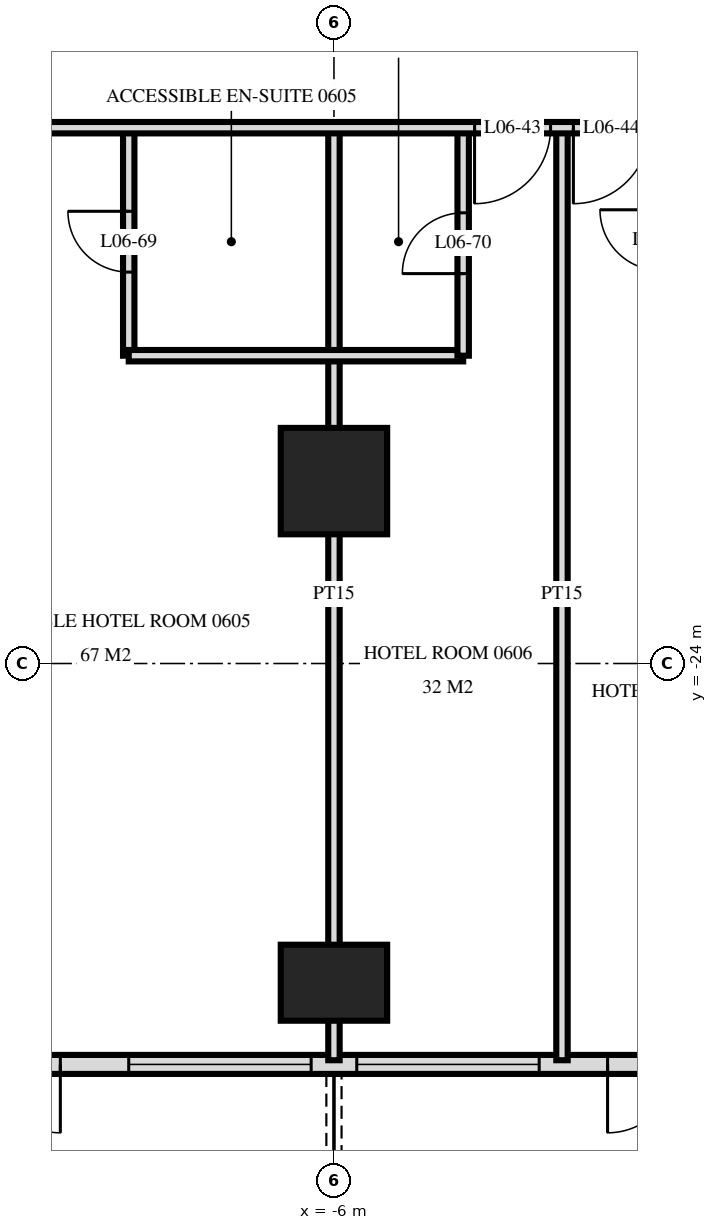
"""IFC4 building model, lengths in metres.
Left out: names, types, materials, properties, quantities, classifications, styles, units other than length and angle.
Written with IfcOpenShell. Run it as: python <this file> out.ifc"""

import sys

from ifc_helpers import new_model, si_unit, direction, frame, frame_2d, origin, origin_2d, place, context, subcontext, project, spatial, rectangle, extrude, element, fill, save


model = new_model("IFC4")
c1 = context("Model", 3, precision=1e-05, world=origin(), true_north=direction((0.0, 1.0)))
c2 = subcontext(c1, "Body", "Model", "MODEL_VIEW")
j1 = project(units=[si_unit("LENGTHUNIT", "METRE"), si_unit("PLANEANGLEUNIT", "RADIAN")], contexts=[c1])
p1 = place(None, origin())
s1 = spatial("IfcSite", under=j1, at=p1, CompositionType="ELEMENT")
p2 = place(p1, origin())
s2 = spatial("IfcBuilding", under=s1, at=p2, CompositionType="ELEMENT")
p3 = place(p2, frame((0.0, 0.0, 31.2)))
s3 = spatial("IfcBuildingStorey", under=s2, at=p3, CompositionType="ELEMENT", Elevation=31.2)
p4 = place(p3, frame((-6.0, -28.2, 0.0), z_axis=(0.0, 0.0, 1.0), x_axis=(1.0, 0.0, 0.0)))
e1 = element("IfcColumn", 1, at=p4, inside=s3, PredefinedType="COLUMN", context=c2, shape_type="SweptSolid", body=[
    extrude(rectangle(XDim=1.4, YDim=1.0, at=origin_2d()), origin(), (0.0, 0.0, 1.0), 3.6),
])
p5 = place(p3, frame((-6.0, -21.6, 0.0), z_axis=(0.0, 0.0, 1.0), x_axis=(1.0, 0.0, 0.0)))
e2 = element("IfcColumn", 2, at=p5, inside=s3, PredefinedType="COLUMN", context=c2, shape_type="SweptSolid", body=[
    extrude(rectangle(XDim=1.4, YDim=1.4, at=origin_2d()), origin(), (0.0, 0.0, 1.0), 3.6),
])
p6 = place(p3, frame((-28.775, -29.275, 0.0), z_axis=(0.0, 0.0, 1.0), x_axis=(1.0, 0.0, 0.0)))
e3 = element("IfcWall", 3, at=p6, inside=s3, PredefinedType="SOLIDWALL", context=c2, shape_type="SweptSolid", body=[
    extrude(rectangle(XDim=57.551, YDim=0.25, at=frame_2d((28.775, 0.0))), origin(), (0.0, 0.0, 1.0), 3.32),
])
p7 = place(p6, frame((0.575, 0.0, 0.0)))
e4 = element("IfcOpeningElement", 4, at=p7, cuts=e3, PredefinedType="OPENING", context=c2, shape_type="SweptSolid", body=[
    extrude(rectangle(XDim=1.8, YDim=2.4, at=frame_2d((0.9, 1.2))), frame((0.0, 0.135, 0.0), z_axis=(0.0, -1.0, 0.0), x_axis=(1.0, 0.0, 0.0)), (0.0, 0.0, 1.0), 0.27),
])
p8 = place(p6, frame((5.375, 0.0, 0.0)))
e5 = element("IfcOpeningElement", 5, at=p8, cuts=e3, PredefinedType="OPENING", context=c2, shape_type="SweptSolid", body=[
    extrude(rectangle(XDim=1.8, YDim=2.4, at=frame_2d((0.9, 1.2))), frame((0.0, 0.135, 0.0), z_axis=(0.0, -1.0, 0.0), x_axis=(1.0, 0.0, 0.0)), (0.0, 0.0, 1.0), 0.27),
])
p9 = place(p6, frame((8.075, 0.0, 0.3)))
e6 = element("IfcOpeningElement", 6, at=p9, cuts=e3, PredefinedType="OPENING", context=c2, shape_type="SweptSolid", body=[
    extrude(rectangle(XDim=2.4, YDim=2.1, at=frame_2d((1.2, 1.05))), frame((0.0, 0.135, 0.0), z_axis=(0.0, -1.0, 0.0), x_axis=(1.0, 0.0, 0.0)), (0.0, 0.0, 1.0), 0.27),
])
p10 = place(p6, frame((11.375, 0.0, 0.0)))
e7 = element("IfcOpeningElement", 7, at=p10, cuts=e3, PredefinedType="OPENING", context=c2, shape_type="SweptSolid", body=[
    extrude(rectangle(XDim=1.8, YDim=2.4, at=frame_2d((0.9, 1.2))), frame((0.0, 0.135, 0.0), z_axis=(0.0, -1.0, 0.0), x_axis=(1.0, 0.0, 0.0)), (0.0, 0.0, 1.0), 0.27),
])
p11 = place(p6, frame((14.075, 0.0, 0.3)))
e8 = element("IfcOpeningElement", 8, at=p11, cuts=e3, PredefinedType="OPENING", context=c2, shape_type="SweptSolid", body=[
    extrude(rectangle(XDim=2.4, YDim=2.1, at=frame_2d((1.2, 1.05))), frame((0.0, 0.135, 0.0), z_axis=(0.0, -1.0, 0.0), x_axis=(1.0, 0.0, 0.0)), (0.0, 0.0, 1.0), 0.27),
])
p12 = place(p6, frame((17.375, 0.0, 0.0)))
e9 = element("IfcOpeningElement", 9, at=p12, cuts=e3, PredefinedType="OPENING", context=c2, shape_type="SweptSolid", body=[
    extrude(rectangle(XDim=1.8, YDim=2.4, at=frame_2d((0.9, 1.2))), frame((0.0, 0.135, 0.0), z_axis=(0.0, -1.0, 0.0), x_axis=(1.0, 0.0, 0.0)), (0.0, 0.0, 1.0), 0.27),
])
p13 = place(p6, frame((20.075, 0.0, 0.3)))
e10 = element("IfcOpeningElement", 10, at=p13, cuts=e3, PredefinedType="OPENING", context=c2, shape_type="SweptSolid", body=[
    extrude(rectangle(XDim=2.4, YDim=2.1, at=frame_2d((1.2, 1.05))), frame((0.0, 0.135, 0.0), z_axis=(0.0, -1.0, 0.0), x_axis=(1.0, 0.0, 0.0)), (0.0, 0.0, 1.0), 0.27),
])
p14 = place(p6, frame((23.075, 0.0, 0.3)))
e11 = element("IfcOpeningElement", 11, at=p14, cuts=e3, PredefinedType="OPENING", context=c2, shape_type="SweptSolid", body=[
    extrude(rectangle(XDim=2.4, YDim=2.1, at=frame_2d((1.2, 1.05))), frame((0.0, 0.135, 0.0), z_axis=(0.0, -1.0, 0.0), x_axis=(1.0, 0.0, 0.0)), (0.0, 0.0, 1.0), 0.27),
])
p15 = place(p6, frame((26.375, 0.0, 0.0)))
e12 = element("IfcOpeningElement", 12, at=p15, cuts=e3, PredefinedType="OPENING", context=c2, shape_type="SweptSolid", body=[
    extrude(rectangle(XDim=1.8, YDim=2.4, at=frame_2d((0.9, 1.2))), frame((0.0, 0.135, 0.0), z_axis=(0.0, -1.0, 0.0), x_axis=(1.0, 0.0, 0.0)), (0.0, 0.0, 1.0), 0.27),
])
p16 = place(p6, frame((29.375, 0.0, 0.0)))
e13 = element("IfcOpeningElement", 13, at=p16, cuts=e3, PredefinedType="OPENING", context=c2, shape_type="SweptSolid", body=[
    extrude(rectangle(XDim=1.8, YDim=2.4, at=frame_2d((0.9, 1.2))), frame((0.0, 0.135, 0.0), z_axis=(0.0, -1.0, 0.0), x_axis=(1.0, 0.0, 0.0)), (0.0, 0.0, 1.0), 0.27),
])
p17 = place(p6, frame((32.075, 0.0, 0.3)))
e14 = element("IfcOpeningElement", 14, at=p17, cuts=e3, PredefinedType="OPENING", context=c2, shape_type="SweptSolid", body=[
    extrude(rectangle(XDim=2.4, YDim=2.1, at=frame_2d((1.2, 1.05))), frame((0.0, 0.135, 0.0), z_axis=(0.0, -1.0, 0.0), x_axis=(1.0, 0.0, 0.0)), (0.0, 0.0, 1.0), 0.27),
])
p18 = place(p6, frame((35.375, 0.0, 0.0)))
e15 = element("IfcOpeningElement", 15, at=p18, cuts=e3, PredefinedType="OPENING", context=c2, shape_type="SweptSolid", body=[
    extrude(rectangle(XDim=1.8, YDim=2.4, at=frame_2d((0.9, 1.2))), frame((0.0, 0.135, 0.0), z_axis=(0.0, -1.0, 0.0), x_axis=(1.0, 0.0, 0.0)), (0.0, 0.0, 1.0), 0.27),
])
p19 = place(p6, frame((38.075, 0.0, 0.3)))
e16 = element("IfcOpeningElement", 16, at=p19, cuts=e3, PredefinedType="OPENING", context=c2, shape_type="SweptSolid", body=[
    extrude(rectangle(XDim=2.4, YDim=2.1, at=frame_2d((1.2, 1.05))), frame((0.0, 0.135, 0.0), z_axis=(0.0, -1.0, 0.0), x_axis=(1.0, 0.0, 0.0)), (0.0, 0.0, 1.0), 0.27),
])
p20 = place(p6, frame((41.375, 0.0, 0.0)))
e17 = element("IfcOpeningElement", 17, at=p20, cuts=e3, PredefinedType="OPENING", context=c2, shape_type="SweptSolid", body=[
    extrude(rectangle(XDim=1.8, YDim=2.4, at=frame_2d((0.9, 1.2))), frame((0.0, 0.135, 0.0), z_axis=(0.0, -1.0, 0.0), x_axis=(1.0, 0.0, 0.0)), (0.0, 0.0, 1.0), 0.27),
])
p21 = place(p6, frame((44.075, 0.0, 0.3)))
e18 = element("IfcOpeningElement", 18, at=p21, cuts=e3, PredefinedType="OPENING", context=c2, shape_type="SweptSolid", body=[
    extrude(rectangle(XDim=2.4, YDim=2.1, at=frame_2d((1.2, 1.05))), frame((0.0, 0.135, 0.0), z_axis=(0.0, -1.0, 0.0), x_axis=(1.0, 0.0, 0.0)), (0.0, 0.0, 1.0), 0.27),
])
p22 = place(p6, frame((47.075, 0.0, 0.3)))
e19 = element("IfcOpeningElement", 19, at=p22, cuts=e3, PredefinedType="OPENING", context=c2, shape_type="SweptSolid", body=[
    extrude(rectangle(XDim=2.4, YDim=2.1, at=frame_2d((1.2, 1.05))), frame((0.0, 0.135, 0.0), z_axis=(0.0, -1.0, 0.0), x_axis=(1.0, 0.0, 0.0)), (0.0, 0.0, 1.0), 0.27),
])
p23 = place(p6, frame((50.375, 0.0, 0.0)))
e20 = element("IfcOpeningElement", 20, at=p23, cuts=e3, PredefinedType="OPENING", context=c2, shape_type="SweptSolid", body=[
    extrude(rectangle(XDim=1.8, YDim=2.4, at=frame_2d((0.9, 1.2))), frame((0.0, 0.135, 0.0), z_axis=(0.0, -1.0, 0.0), x_axis=(1.0, 0.0, 0.0)), (0.0, 0.0, 1.0), 0.27),
])
p24 = place(p6, frame((53.375, 0.0, 0.0)))
e21 = element("IfcOpeningElement", 21, at=p24, cuts=e3, PredefinedType="OPENING", context=c2, shape_type="SweptSolid", body=[
    extrude(rectangle(XDim=1.8, YDim=2.4, at=frame_2d((0.9, 1.2))), frame((0.0, 0.135, 0.0), z_axis=(0.0, -1.0, 0.0), x_axis=(1.0, 0.0, 0.0)), (0.0, 0.0, 1.0), 0.27),
])
p25 = place(p3, frame((-3.0, -29.22, 0.0), z_axis=(0.0, 0.0, 1.0), x_axis=(0.0, 1.0, 0.0)))
e22 = element("IfcWall", 22, at=p25, inside=s3, PredefinedType="PARTITIONING", context=c2, shape_type="SweptSolid", body=[
    extrude(rectangle(XDim=12.27, YDim=0.15, at=frame_2d((6.135, 0.0))), origin(), (0.0, 0.0, 1.0), 3.32),
])
p26 = place(p3, frame((-4.3, -19.95, 0.0), z_axis=(0.0, 0.0, 1.0), x_axis=(0.0, 1.0, 0.0)))
e23 = element("IfcWall", 23, at=p26, inside=s3, PredefinedType="PARTITIONING", context=c2, shape_type="SweptSolid", body=[
    extrude(rectangle(XDim=3.0, YDim=0.15, at=frame_2d((1.5, 0.0))), origin(), (0.0, 0.0, 1.0), 3.32),
])
p27 = place(p26, frame((1.08, 0.0, 0.0)))
e24 = element("IfcOpeningElement", 24, at=p27, cuts=e23, PredefinedType="OPENING", context=c2, shape_type="SweptSolid", body=[
    extrude(rectangle(XDim=0.8, YDim=2.1, at=frame_2d((0.4, 1.05))), frame((0.0, 0.085, 0.0), z_axis=(0.0, -1.0, 0.0), x_axis=(1.0, 0.0, 0.0)), (0.0, 0.0, 1.0), 0.17),
])
p28 = place(p3, frame((-6.0, -29.22, 0.0), z_axis=(0.0, 0.0, 1.0), x_axis=(0.0, 1.0, 0.0)))
e25 = element("IfcWall", 25, at=p28, inside=s3, PredefinedType="PARTITIONING", context=c2, shape_type="SweptSolid", body=[
    extrude(rectangle(XDim=12.27, YDim=0.15, at=frame_2d((6.135, 0.0))), origin(), (0.0, 0.0, 1.0), 3.32),
])
p29 = place(p3, frame((-8.7, -19.95, 0.0), z_axis=(0.0, 0.0, 1.0), x_axis=(0.0, 1.0, 0.0)))
e26 = element("IfcWall", 26, at=p29, inside=s3, PredefinedType="PARTITIONING", context=c2, shape_type="SweptSolid", body=[
    extrude(rectangle(XDim=3.0, YDim=0.15, at=frame_2d((1.5, 0.0))), origin(), (0.0, 0.0, 1.0), 3.32),
])
p30 = place(p29, frame((1.1, 0.0, 0.0)))
e27 = element("IfcOpeningElement", 27, at=p30, cuts=e26, PredefinedType="OPENING", context=c2, shape_type="SweptSolid", body=[
    extrude(rectangle(XDim=0.8, YDim=2.1, at=frame_2d((0.4, 1.05))), frame((0.0, 0.085, 0.0), z_axis=(0.0, -1.0, 0.0), x_axis=(1.0, 0.0, 0.0)), (0.0, 0.0, 1.0), 0.17),
])
p31 = place(p3, frame((-8.7, -19.95, 0.0), z_axis=(0.0, 0.0, 1.0), x_axis=(1.0, 0.0, 0.0)))
e28 = element("IfcWall", 28, at=p31, inside=s3, PredefinedType="PARTITIONING", context=c2, shape_type="SweptSolid", body=[
    extrude(rectangle(XDim=4.4, YDim=0.15, at=frame_2d((2.2, 0.0))), origin(), (0.0, 0.0, 1.0), 3.32),
])
p32 = place(p3, frame((-33.12, -16.95, 0.0), z_axis=(0.0, 0.0, 1.0), x_axis=(1.0, 0.0, 0.0)))
e29 = element("IfcWall", 29, at=p32, inside=s3, PredefinedType="PARTITIONING", context=c2, shape_type="SweptSolid", body=[
    extrude(rectangle(XDim=66.24, YDim=0.15, at=frame_2d((33.12, 0.0))), origin(), (0.0, 0.0, 1.0), 3.32),
])
p33 = place(p32, frame((9.27, 0.0, 0.0)))
e30 = element("IfcOpeningElement", 30, at=p33, cuts=e29, PredefinedType="OPENING", context=c2, shape_type="SweptSolid", body=[
    extrude(rectangle(XDim=1.0, YDim=2.1, at=frame_2d((0.5, 1.05))), frame((0.0, 0.085, 0.0), z_axis=(0.0, -1.0, 0.0), x_axis=(1.0, 0.0, 0.0)), (0.0, 0.0, 1.0), 0.17),
])
p34 = place(p32, frame((13.97, 0.0, 0.0)))
e31 = element("IfcOpeningElement", 31, at=p34, cuts=e29, PredefinedType="OPENING", context=c2, shape_type="SweptSolid", body=[
    extrude(rectangle(XDim=1.0, YDim=2.1, at=frame_2d((0.5, 1.05))), frame((0.0, 0.085, 0.0), z_axis=(0.0, -1.0, 0.0), x_axis=(1.0, 0.0, 0.0)), (0.0, 0.0, 1.0), 0.17),
])
p35 = place(p32, frame((15.27, 0.0, 0.0)))
e32 = element("IfcOpeningElement", 32, at=p35, cuts=e29, PredefinedType="OPENING", context=c2, shape_type="SweptSolid", body=[
    extrude(rectangle(XDim=1.0, YDim=2.1, at=frame_2d((0.5, 1.05))), frame((0.0, 0.085, 0.0), z_axis=(0.0, -1.0, 0.0), x_axis=(1.0, 0.0, 0.0)), (0.0, 0.0, 1.0), 0.17),
])
p36 = place(p32, frame((19.97, 0.0, 0.0)))
e33 = element("IfcOpeningElement", 33, at=p36, cuts=e29, PredefinedType="OPENING", context=c2, shape_type="SweptSolid", body=[
    extrude(rectangle(XDim=1.0, YDim=2.1, at=frame_2d((0.5, 1.05))), frame((0.0, 0.085, 0.0), z_axis=(0.0, -1.0, 0.0), x_axis=(1.0, 0.0, 0.0)), (0.0, 0.0, 1.0), 0.17),
])
p37 = place(p32, frame((22.27, 0.0, 0.0)))
e34 = element("IfcOpeningElement", 34, at=p37, cuts=e29, PredefinedType="OPENING", context=c2, shape_type="SweptSolid", body=[
    extrude(rectangle(XDim=1.0, YDim=2.1, at=frame_2d((0.5, 1.05))), frame((0.0, 0.085, 0.0), z_axis=(0.0, -1.0, 0.0), x_axis=(1.0, 0.0, 0.0)), (0.0, 0.0, 1.0), 0.17),
])
p38 = place(p32, frame((28.97, 0.0, 0.0)))
e35 = element("IfcOpeningElement", 35, at=p38, cuts=e29, PredefinedType="OPENING", context=c2, shape_type="SweptSolid", body=[
    extrude(rectangle(XDim=1.0, YDim=2.1, at=frame_2d((0.5, 1.05))), frame((0.0, 0.085, 0.0), z_axis=(0.0, -1.0, 0.0), x_axis=(1.0, 0.0, 0.0)), (0.0, 0.0, 1.0), 0.17),
])
p39 = place(p32, frame((30.27, 0.0, 0.0)))
e36 = element("IfcOpeningElement", 36, at=p39, cuts=e29, PredefinedType="OPENING", context=c2, shape_type="SweptSolid", body=[
    extrude(rectangle(XDim=1.0, YDim=2.1, at=frame_2d((0.5, 1.05))), frame((0.0, 0.085, 0.0), z_axis=(0.0, -1.0, 0.0), x_axis=(1.0, 0.0, 0.0)), (0.0, 0.0, 1.0), 0.17),
])
p40 = place(p32, frame((34.97, 0.0, 0.0)))
e37 = element("IfcOpeningElement", 37, at=p40, cuts=e29, PredefinedType="OPENING", context=c2, shape_type="SweptSolid", body=[
    extrude(rectangle(XDim=1.0, YDim=2.1, at=frame_2d((0.5, 1.05))), frame((0.0, 0.085, 0.0), z_axis=(0.0, -1.0, 0.0), x_axis=(1.0, 0.0, 0.0)), (0.0, 0.0, 1.0), 0.17),
])
p41 = place(p32, frame((36.27, 0.0, 0.0)))
e38 = element("IfcOpeningElement", 38, at=p41, cuts=e29, PredefinedType="OPENING", context=c2, shape_type="SweptSolid", body=[
    extrude(rectangle(XDim=1.0, YDim=2.1, at=frame_2d((0.5, 1.05))), frame((0.0, 0.085, 0.0), z_axis=(0.0, -1.0, 0.0), x_axis=(1.0, 0.0, 0.0)), (0.0, 0.0, 1.0), 0.17),
])
p42 = place(p32, frame((40.97, 0.0, 0.0)))
e39 = element("IfcOpeningElement", 39, at=p42, cuts=e29, PredefinedType="OPENING", context=c2, shape_type="SweptSolid", body=[
    extrude(rectangle(XDim=1.0, YDim=2.1, at=frame_2d((0.5, 1.05))), frame((0.0, 0.085, 0.0), z_axis=(0.0, -1.0, 0.0), x_axis=(1.0, 0.0, 0.0)), (0.0, 0.0, 1.0), 0.17),
])
p43 = place(p32, frame((42.27, 0.0, 0.0)))
e40 = element("IfcOpeningElement", 40, at=p43, cuts=e29, PredefinedType="OPENING", context=c2, shape_type="SweptSolid", body=[
    extrude(rectangle(XDim=1.0, YDim=2.1, at=frame_2d((0.5, 1.05))), frame((0.0, 0.085, 0.0), z_axis=(0.0, -1.0, 0.0), x_axis=(1.0, 0.0, 0.0)), (0.0, 0.0, 1.0), 0.17),
])
p44 = place(p32, frame((46.97, 0.0, 0.0)))
e41 = element("IfcOpeningElement", 41, at=p44, cuts=e29, PredefinedType="OPENING", context=c2, shape_type="SweptSolid", body=[
    extrude(rectangle(XDim=1.0, YDim=2.1, at=frame_2d((0.5, 1.05))), frame((0.0, 0.085, 0.0), z_axis=(0.0, -1.0, 0.0), x_axis=(1.0, 0.0, 0.0)), (0.0, 0.0, 1.0), 0.17),
])
p45 = place(p32, frame((48.27, 0.0, 0.0)))
e42 = element("IfcOpeningElement", 42, at=p45, cuts=e29, PredefinedType="OPENING", context=c2, shape_type="SweptSolid", body=[
    extrude(rectangle(XDim=1.0, YDim=2.1, at=frame_2d((0.5, 1.05))), frame((0.0, 0.085, 0.0), z_axis=(0.0, -1.0, 0.0), x_axis=(1.0, 0.0, 0.0)), (0.0, 0.0, 1.0), 0.17),
])
p46 = place(p32, frame((52.97, 0.0, 0.0)))
e43 = element("IfcOpeningElement", 43, at=p46, cuts=e29, PredefinedType="OPENING", context=c2, shape_type="SweptSolid", body=[
    extrude(rectangle(XDim=1.0, YDim=2.1, at=frame_2d((0.5, 1.05))), frame((0.0, 0.085, 0.0), z_axis=(0.0, -1.0, 0.0), x_axis=(1.0, 0.0, 0.0)), (0.0, 0.0, 1.0), 0.17),
])
p47 = place(p32, frame((54.27, 0.0, 0.0)))
e44 = element("IfcOpeningElement", 44, at=p47, cuts=e29, PredefinedType="OPENING", context=c2, shape_type="SweptSolid", body=[
    extrude(rectangle(XDim=1.0, YDim=2.1, at=frame_2d((0.5, 1.05))), frame((0.0, 0.085, 0.0), z_axis=(0.0, -1.0, 0.0), x_axis=(1.0, 0.0, 0.0)), (0.0, 0.0, 1.0), 0.17),
])
p48 = place(p32, frame((4.4, 0.0, 0.0)))
e45 = element("IfcOpeningElement", 45, at=p48, cuts=e29, PredefinedType="OPENING", context=c2, shape_type="SweptSolid", body=[
    extrude(rectangle(XDim=1.0, YDim=2.1, at=frame_2d((0.5, 1.05))), frame((0.0, 0.085, 0.0), z_axis=(0.0, -1.0, 0.0), x_axis=(1.0, 0.0, 0.0)), (0.0, 0.0, 1.0), 0.17),
])
p49 = place(p32, frame((60.8, 0.0, 0.0)))
e46 = element("IfcOpeningElement", 46, at=p49, cuts=e29, PredefinedType="OPENING", context=c2, shape_type="SweptSolid", body=[
    extrude(rectangle(XDim=1.0, YDim=2.1, at=frame_2d((0.5, 1.05))), frame((0.0, 0.085, 0.0), z_axis=(0.0, -1.0, 0.0), x_axis=(1.0, 0.0, 0.0)), (0.0, 0.0, 1.0), 0.17),
])
p50 = place(p12, frame((0.9, 0.0, 0.0), z_axis=(0.0, 0.0, 1.0), x_axis=(-1.0, 0.0, 0.0)))
e47 = element("IfcDoor", 47, at=p50, inside=s3, OperationType="DOUBLE_DOOR_SINGLE_SWING", PredefinedType="DOOR", context=c2, shape_type="SweptSolid", body=[
    extrude(rectangle(XDim=1.8, YDim=2.4, at=frame_2d((0.0, 1.2))), frame((0.0, -0.025, 0.0), z_axis=(0.0, 1.0, 0.0), x_axis=(-1.0, 0.0, 0.0)), (0.0, 0.0, 1.0), 0.05),
])
fill(e9, e47)
p51 = place(p13, origin())
e48 = element("IfcWindow", 48, at=p51, inside=s3, PartitioningType="SINGLE_PANEL", PredefinedType="WINDOW", context=c2, shape_type="SweptSolid", body=[
    extrude(rectangle(XDim=2.4, YDim=2.1, at=frame_2d((1.2, 1.05))), frame((0.0, 0.03, 0.0), z_axis=(0.0, -1.0, 0.0), x_axis=(1.0, 0.0, 0.0)), (0.0, 0.0, 1.0), 0.06),
])
fill(e10, e48)
p52 = place(p14, origin())
e49 = element("IfcWindow", 49, at=p52, inside=s3, PartitioningType="SINGLE_PANEL", PredefinedType="WINDOW", context=c2, shape_type="SweptSolid", body=[
    extrude(rectangle(XDim=2.4, YDim=2.1, at=frame_2d((1.2, 1.05))), frame((0.0, 0.03, 0.0), z_axis=(0.0, -1.0, 0.0), x_axis=(1.0, 0.0, 0.0)), (0.0, 0.0, 1.0), 0.06),
])
fill(e11, e49)
p53 = place(p15, frame((0.9, 0.0, 0.0), z_axis=(0.0, 0.0, 1.0), x_axis=(-1.0, 0.0, 0.0)))
e50 = element("IfcDoor", 50, at=p53, inside=s3, OperationType="DOUBLE_DOOR_SINGLE_SWING", PredefinedType="DOOR", context=c2, shape_type="SweptSolid", body=[
    extrude(rectangle(XDim=1.8, YDim=2.4, at=frame_2d((0.0, 1.2))), frame((0.0, -0.025, 0.0), z_axis=(0.0, 1.0, 0.0), x_axis=(-1.0, 0.0, 0.0)), (0.0, 0.0, 1.0), 0.05),
])
fill(e12, e50)
p54 = place(p38, frame((0.5, 0.0, 0.0), z_axis=(0.0, 0.0, 1.0), x_axis=(-1.0, 0.0, 0.0)))
e51 = element("IfcDoor", 51, at=p54, inside=s3, OperationType="SINGLE_SWING_LEFT", PredefinedType="DOOR", context=c2, shape_type="SweptSolid", body=[
    extrude(rectangle(XDim=1.0, YDim=2.1, at=frame_2d((0.0, 1.05))), frame((0.0, -0.025, 0.0), z_axis=(0.0, 1.0, 0.0), x_axis=(-1.0, 0.0, 0.0)), (0.0, 0.0, 1.0), 0.05),
])
fill(e35, e51)
p55 = place(p39, frame((0.5, 0.0, 0.0), z_axis=(0.0, 0.0, 1.0), x_axis=(-1.0, 0.0, 0.0)))
e52 = element("IfcDoor", 52, at=p55, inside=s3, OperationType="SINGLE_SWING_LEFT", PredefinedType="DOOR", context=c2, shape_type="SweptSolid", body=[
    extrude(rectangle(XDim=1.0, YDim=2.1, at=frame_2d((0.0, 1.05))), frame((0.0, -0.025, 0.0), z_axis=(0.0, 1.0, 0.0), x_axis=(-1.0, 0.0, 0.0)), (0.0, 0.0, 1.0), 0.05),
])
fill(e36, e52)
p56 = place(p30, origin())
e53 = element("IfcDoor", 53, at=p56, inside=s3, OperationType="SINGLE_SWING_LEFT", PredefinedType="DOOR", context=c2, shape_type="SweptSolid", body=[
    extrude(rectangle(XDim=0.8, YDim=2.1, at=frame_2d((0.4, 1.05))), frame((0.0, 0.025, 0.0), z_axis=(0.0, -1.0, 0.0), x_axis=(1.0, 0.0, 0.0)), (0.0, 0.0, 1.0), 0.05),
])
fill(e27, e53)
p57 = place(p27, origin())
e54 = element("IfcDoor", 54, at=p57, inside=s3, OperationType="SINGLE_SWING_RIGHT", PredefinedType="DOOR", context=c2, shape_type="SweptSolid", body=[
    extrude(rectangle(XDim=0.8, YDim=2.1, at=frame_2d((0.4, 1.05))), frame((0.0, 0.025, 0.0), z_axis=(0.0, -1.0, 0.0), x_axis=(1.0, 0.0, 0.0)), (0.0, 0.0, 1.0), 0.05),
])
fill(e24, e54)
save(model, sys.argv[1])
